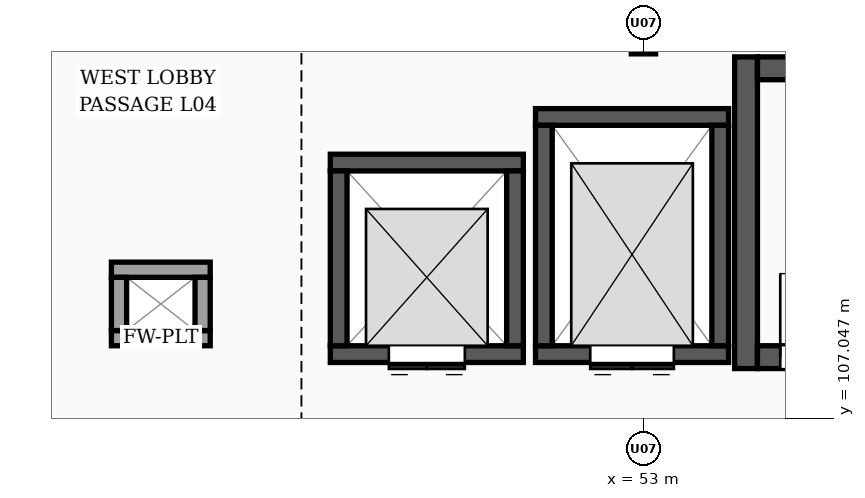
"""IFC4 building model, lengths in metres.
Left out: names, types, materials, properties, quantities, classifications, styles, units other than length and angle.
Written with IfcOpenShell. Run it as: python <this file> out.ifc"""

import sys

from ifc_helpers import new_model, si_unit, direction, frame, frame_2d, origin, origin_2d, place, context, subcontext, project, spatial, rectangle, extrude, element, fill, save


model = new_model("IFC4")
c1 = context("Model", 3, precision=1e-05, world=origin(), true_north=direction((0.0, 1.0)))
c2 = subcontext(c1, "Body", "Model", "MODEL_VIEW")
j1 = project(units=[si_unit("LENGTHUNIT", "METRE"), si_unit("PLANEANGLEUNIT", "RADIAN")], contexts=[c1])
p1 = place(None, origin())
s1 = spatial("IfcSite", under=j1, at=p1, CompositionType="ELEMENT")
p2 = place(p1, origin())
s2 = spatial("IfcBuilding", under=s1, at=p2, CompositionType="ELEMENT")
p3 = place(p2, frame((0.0, 0.0, 16.2)))
s3 = spatial("IfcBuildingStorey", under=s2, at=p3, CompositionType="ELEMENT", Elevation=16.2)
p4 = place(p3, frame((53.0, 112.0, 0.0), z_axis=(0.0, 0.0, 1.0), x_axis=(1.0, 0.0, 0.0)))
e1 = element("IfcColumn", 1, at=p4, inside=s3, PredefinedType="COLUMN", context=c2, shape_type="SweptSolid", body=[
    extrude(rectangle(XDim=0.32, YDim=0.32, at=origin_2d()), origin(), (0.0, 0.0, 1.0), 3.9),
])
p5 = place(p3, frame((54.35, 107.7, 0.0), z_axis=(0.0, 0.0, 1.0), x_axis=(0.0, 1.0, 0.0)))
e2 = element("IfcWall", 2, at=p5, inside=s3, PredefinedType="SHEAR", context=c2, shape_type="SweptSolid", body=[
    extrude(rectangle(XDim=4.1, YDim=0.3, at=frame_2d((2.05, 0.0))), origin(), (0.0, 0.0, 1.0), 3.65),
])
p6 = place(p3, frame((54.5, 107.85, 0.0), z_axis=(0.0, 0.0, 1.0), x_axis=(1.0, 0.0, 0.0)))
e3 = element("IfcWall", 3, at=p6, inside=s3, PredefinedType="SHEAR", context=c2, shape_type="SweptSolid", body=[
    extrude(rectangle(XDim=6.8, YDim=0.3, at=frame_2d((3.4, 0.0))), origin(), (0.0, 0.0, 1.0), 3.65),
])
p7 = place(p6, frame((0.3, 0.0, 0.0)))
e4 = element("IfcOpeningElement", 4, at=p7, cuts=e3, PredefinedType="OPENING", context=c2, shape_type="SweptSolid", body=[
    extrude(rectangle(XDim=1.1, YDim=2.15, at=frame_2d((0.55, 1.075))), frame((0.0, 0.16, 0.0), z_axis=(0.0, -1.0, 0.0), x_axis=(1.0, 0.0, 0.0)), (0.0, 0.0, 1.0), 0.32),
])
p8 = place(p3, frame((61.3, 111.65, 0.0), z_axis=(0.0, 0.0, 1.0), x_axis=(-1.0, 0.0, 0.0)))
e5 = element("IfcWall", 5, at=p8, inside=s3, PredefinedType="SHEAR", context=c2, shape_type="SweptSolid", body=[
    extrude(rectangle(XDim=6.8, YDim=0.3, at=frame_2d((3.4, 0.0))), origin(), (0.0, 0.0, 1.0), 3.65),
])
p9 = place(p3, frame((54.12, 107.89, 0.0), z_axis=(0.0, 0.0, 1.0), x_axis=(-1.0, 0.0, 0.0)))
e6 = element("IfcWall", 6, at=p9, inside=s3, PredefinedType="SHEAR", context=c2, shape_type="SweptSolid", body=[
    extrude(rectangle(XDim=2.54, YDim=0.22, at=frame_2d((1.27, 0.0))), origin(), (0.0, 0.0, 1.0), 3.65),
])
p10 = place(p9, frame((0.72, 0.0, 0.0)))
e7 = element("IfcOpeningElement", 7, at=p10, cuts=e6, PredefinedType="OPENING", context=c2, shape_type="SweptSolid", body=[
    extrude(rectangle(XDim=1.1, YDim=2.15, at=frame_2d((0.55, 1.075))), frame((0.0, 0.12, 0.0), z_axis=(0.0, -1.0, 0.0), x_axis=(1.0, 0.0, 0.0)), (0.0, 0.0, 1.0), 0.24),
])
p11 = place(p3, frame((51.58, 111.01, 0.0), z_axis=(0.0, 0.0, 1.0), x_axis=(1.0, 0.0, 0.0)))
e8 = element("IfcWall", 8, at=p11, inside=s3, PredefinedType="SHEAR", context=c2, shape_type="SweptSolid", body=[
    extrude(rectangle(XDim=2.54, YDim=0.22, at=frame_2d((1.27, 0.0))), origin(), (0.0, 0.0, 1.0), 3.65),
])
for number, where, z_axis, x_axis in (
    (9, (51.69, 108.0, 0.0), (0.0, 0.0, 1.0), (0.0, 1.0, 0.0)),
    (10, (54.01, 110.9, 0.0), (0.0, 0.0, 1.0), (0.0, -1.0, 0.0)),
):
    element("IfcWall", number, at=place(p3, frame(where, z_axis=z_axis, x_axis=x_axis)), inside=s3, PredefinedType="SHEAR", context=c2, shape_type="SweptSolid", body=[
        extrude(rectangle(XDim=2.9, YDim=0.22, at=frame_2d((1.45, 0.0))), origin(), (0.0, 0.0, 1.0), 3.65),
    ])
p12 = place(p3, frame((51.42, 107.89, 0.0), z_axis=(0.0, 0.0, 1.0), x_axis=(-1.0, 0.0, 0.0)))
e11 = element("IfcWall", 11, at=p12, inside=s3, PredefinedType="SHEAR", context=c2, shape_type="SweptSolid", body=[
    extrude(rectangle(XDim=2.54, YDim=0.22, at=frame_2d((1.27, 0.0))), origin(), (0.0, 0.0, 1.0), 3.65),
])
p13 = place(p12, frame((0.77, 0.0, 0.0)))
e12 = element("IfcOpeningElement", 12, at=p13, cuts=e11, PredefinedType="OPENING", context=c2, shape_type="SweptSolid", body=[
    extrude(rectangle(XDim=1.0, YDim=2.15, at=frame_2d((0.5, 1.075))), frame((0.0, 0.12, 0.0), z_axis=(0.0, -1.0, 0.0), x_axis=(1.0, 0.0, 0.0)), (0.0, 0.0, 1.0), 0.24),
])
p14 = place(p3, frame((48.88, 110.41, 0.0), z_axis=(0.0, 0.0, 1.0), x_axis=(1.0, 0.0, 0.0)))
e13 = element("IfcWall", 13, at=p14, inside=s3, PredefinedType="SHEAR", context=c2, shape_type="SweptSolid", body=[
    extrude(rectangle(XDim=2.54, YDim=0.22, at=frame_2d((1.27, 0.0))), origin(), (0.0, 0.0, 1.0), 3.65),
])
for number, where, z_axis, x_axis in (
    (14, (48.99, 108.0, 0.0), (0.0, 0.0, 1.0), (0.0, 1.0, 0.0)),
    (15, (51.31, 110.3, 0.0), (0.0, 0.0, 1.0), (0.0, -1.0, 0.0)),
):
    element("IfcWall", number, at=place(p3, frame(where, z_axis=z_axis, x_axis=x_axis)), inside=s3, PredefinedType="SHEAR", context=c2, shape_type="SweptSolid", body=[
        extrude(rectangle(XDim=2.3, YDim=0.22, at=frame_2d((1.15, 0.0))), origin(), (0.0, 0.0, 1.0), 3.65),
    ])
for number, where, z_axis, x_axis in (
    (16, (47.3, 108.1, 0.0), (0.0, 0.0, 1.0), (-1.0, 0.0, 0.0)),
    (17, (46.0, 109.0, 0.0), (0.0, 0.0, 1.0), (1.0, 0.0, 0.0)),
):
    element("IfcWall", number, at=place(p3, frame(where, z_axis=z_axis, x_axis=x_axis)), inside=s3, PredefinedType="PARTITIONING", context=c2, shape_type="SweptSolid", body=[
        extrude(rectangle(XDim=1.3, YDim=0.2, at=frame_2d((0.65, 0.0))), origin(), (0.0, 0.0, 1.0), 3.65),
    ])
p15 = place(p3, frame((46.1, 108.2, 0.0), z_axis=(0.0, 0.0, 1.0), x_axis=(0.0, 1.0, 0.0)))
e18 = element("IfcWall", 18, at=p15, inside=s3, PredefinedType="PARTITIONING", context=c2, shape_type="SweptSolid", body=[
    extrude(rectangle(XDim=0.7, YDim=0.2, at=frame_2d((0.35, 0.0))), origin(), (0.0, 0.0, 1.0), 3.65),
])
p16 = place(p3, frame((47.2, 108.9, 0.0), z_axis=(0.0, 0.0, 1.0), x_axis=(0.0, -1.0, 0.0)))
e19 = element("IfcWall", 19, at=p16, inside=s3, PredefinedType="PARTITIONING", context=c2, shape_type="SweptSolid", body=[
    extrude(rectangle(XDim=0.7, YDim=0.2, at=frame_2d((0.35, 0.0))), origin(), (0.0, 0.0, 1.0), 3.25),
])
p17 = place(p7, origin())
e20 = element("IfcDoor", 20, at=p17, inside=s3, OperationType="SINGLE_SWING_LEFT", PredefinedType="DOOR", context=c2, shape_type="SweptSolid", body=[
    extrude(rectangle(XDim=1.1, YDim=2.15, at=frame_2d((0.55, 1.075))), frame((0.0, 0.025, 0.0), z_axis=(0.0, -1.0, 0.0), x_axis=(1.0, 0.0, 0.0)), (0.0, 0.0, 1.0), 0.05),
])
fill(e4, e20)
p18 = place(p10, origin())
e21 = element("IfcDoor", 21, at=p18, inside=s3, OperationType="DOUBLE_DOOR_SLIDING", PredefinedType="DOOR", context=c2, shape_type="SweptSolid", body=[
    extrude(rectangle(XDim=1.1, YDim=2.15, at=frame_2d((0.55, 1.075))), frame((0.0, 0.025, 0.0), z_axis=(0.0, -1.0, 0.0), x_axis=(1.0, 0.0, 0.0)), (0.0, 0.0, 1.0), 0.05),
])
fill(e7, e21)
p19 = place(p13, origin())
e22 = element("IfcDoor", 22, at=p19, inside=s3, OperationType="DOUBLE_DOOR_SLIDING", PredefinedType="DOOR", context=c2, shape_type="SweptSolid", body=[
    extrude(rectangle(XDim=1.0, YDim=2.15, at=frame_2d((0.5, 1.075))), frame((0.0, 0.025, 0.0), z_axis=(0.0, -1.0, 0.0), x_axis=(1.0, 0.0, 0.0)), (0.0, 0.0, 1.0), 0.05),
])
fill(e12, e22)
save(model, sys.argv[1])
